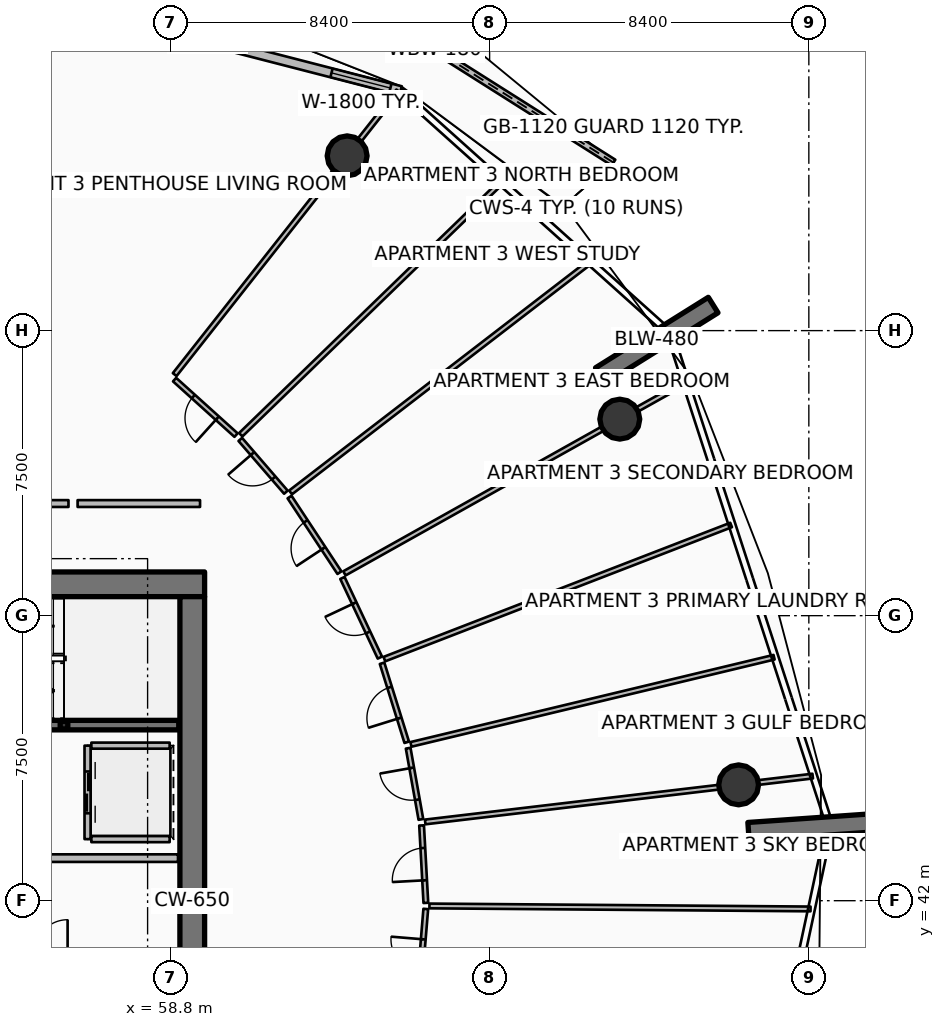
"""IFC4 building model, lengths in metres.
Left out: names, types, materials, properties, quantities, classifications, styles, units other than length and angle.
Written with IfcOpenShell. Run it as: python <this file> out.ifc"""

import sys

from ifc_helpers import new_model, si_unit, direction, frame, frame_2d, origin, origin_2d, place, context, subcontext, project, spatial, polyline, rectangle, hollow_rectangle, circle, outline, extrude, element, fill, save


model = new_model("IFC4")
c1 = context("Model", 3, precision=1e-05, world=origin(), true_north=direction((0.0, 1.0)))
c2 = subcontext(c1, "Body", "Model", "MODEL_VIEW")
j1 = project(units=[si_unit("LENGTHUNIT", "METRE"), si_unit("PLANEANGLEUNIT", "RADIAN")], contexts=[c1])
p1 = place(None, origin())
s1 = spatial("IfcSite", under=j1, at=p1, CompositionType="ELEMENT")
p2 = place(p1, origin())
s2 = spatial("IfcBuilding", under=s1, at=p2, CompositionType="ELEMENT")
p3 = place(p2, frame((0.0, 0.0, 187.8)))
s3 = spatial("IfcBuildingStorey", under=s2, at=p3, CompositionType="ELEMENT", Elevation=187.8)
p4 = place(p3, frame((49.95, 50.325, 0.0), z_axis=(0.0, 0.0, 1.0), x_axis=(1.0, 0.0, 0.0)))
e1 = element("IfcWall", 1, at=p4, inside=s3, PredefinedType="SHEAR", context=c2, shape_type="SweptSolid", body=[
    extrude(rectangle(XDim=9.75, YDim=0.65, at=frame_2d((4.875, 0.0))), origin(), (0.0, 0.0, 1.0), 3.75),
])
p5 = place(p3, frame((59.375, 34.0, 0.0), z_axis=(0.0, 0.0, 1.0), x_axis=(0.0, 1.0, 0.0)))
e2 = element("IfcWall", 2, at=p5, inside=s3, PredefinedType="SHEAR", context=c2, shape_type="SweptSolid", body=[
    extrude(rectangle(XDim=16.0, YDim=0.65, at=frame_2d((8.0, 0.0))), origin(), (0.0, 0.0, 1.0), 3.75),
])
p6 = place(p3, frame((56.0, 46.62, 0.0), z_axis=(0.0, 0.0, 1.0), x_axis=(1.0, 0.0, 0.0)))
e3 = element("IfcColumn", 3, at=p6, inside=s3, PredefinedType="COLUMN", context=c2, shape_type="SweptSolid", body=[
    extrude(hollow_rectangle(XDim=0.2, YDim=0.2, WallThickness=0.01, InnerFilletRadius=0.01, OuterFilletRadius=0.02, at=origin_2d()), origin(), (0.0, 0.0, 1.0), 1.67),
])
p7 = place(p3, frame((70.114, 55.818, 0.0), z_axis=(0.0, 0.0, 1.0), x_axis=(0.848033572426, 0.529942506352, 0.0)))
e4 = element("IfcWall", 4, at=p7, inside=s3, PredefinedType="SOLIDWALL", context=c2, shape_type="SweptSolid", body=[
    extrude(rectangle(XDim=3.5, YDim=0.48, at=frame_2d((1.75, 0.0))), origin(), (0.0, 0.0, 1.0), 3.75),
])
p8 = place(p3, frame((74.013, 43.819, 0.0), z_axis=(0.0, 0.0, 1.0), x_axis=(0.997568676264, 0.069690287244, 0.0)))
e5 = element("IfcWall", 5, at=p8, inside=s3, PredefinedType="SOLIDWALL", context=c2, shape_type="SweptSolid", body=[
    extrude(rectangle(XDim=3.5, YDim=0.48, at=frame_2d((1.75, 0.0))), origin(), (0.0, 0.0, 1.0), 3.75),
])
for number, where, z_axis, x_axis in (
    (6, (70.625, 54.671, 0.0), (0.0, 0.0, 1.0), (1.0, 0.0, 0.0)),
    (7, (63.451, 61.599, 0.0), (0.0, 0.0, 1.0), (1.0, 0.0, 0.0)),
    (8, (73.752, 45.048, 0.0), (0.0, 0.0, 1.0), (1.0, 0.0, 0.0)),
):
    element("IfcColumn", number, at=place(p3, frame(where, z_axis=z_axis, x_axis=x_axis)), inside=s3, PredefinedType="COLUMN", context=c2, shape_type="SweptSolid", body=[
        extrude(circle(Radius=0.525, at=origin_2d()), origin(), (0.0, 0.0, 1.0), 3.5),
    ])
p9 = place(p3, frame((70.46, 61.421, 0.0), z_axis=(0.0, 0.0, 1.0), x_axis=(-0.845278126761, 0.53432657469, 0.0)))
e9 = element("IfcWall", 9, at=p9, inside=s3, PredefinedType="PARAPET", context=c2, shape_type="SweptSolid", body=[
    extrude(outline(polyline([(0.0, 0.0), (11.123, 0.0), (11.123, 1.632), (5.562, 1.418), (0.0, 1.233), (0.0, 0.0)])), frame((0.0, 0.09, 0.0), z_axis=(0.0, -1.0, 0.0), x_axis=(1.0, 0.0, 0.0)), (0.0, 0.0, 1.0), 0.18),
])
p10 = place(p3, frame((64.86, 63.313, 0.0), z_axis=(0.0, 0.0, 1.0), x_axis=(-0.968374028006, 0.249502989727, 0.0)))
e10 = element("IfcWall", 10, at=p10, inside=s3, PredefinedType="SOLIDWALL", context=c2, shape_type="SweptSolid", body=[
    extrude(rectangle(XDim=10.494, YDim=0.24, at=frame_2d((5.247, 0.0))), origin(), (0.0, 0.0, 1.0), 2.45),
])
p11 = place(p10, frame((8.274, 0.0, 0.0)))
e11 = element("IfcOpeningElement", 11, at=p11, cuts=e10, PredefinedType="OPENING", context=c2, shape_type="SweptSolid", body=[
    extrude(rectangle(XDim=1.45, YDim=2.15, at=frame_2d((0.725, 1.075))), frame((0.0, 0.13, 0.0), z_axis=(0.0, -1.0, 0.0), x_axis=(1.0, 0.0, 0.0)), (0.0, 0.0, 1.0), 0.26),
])
p12 = place(p10, frame((0.28, 0.0, 0.65)))
e12 = element("IfcOpeningElement", 12, at=p12, cuts=e10, PredefinedType="OPENING", context=c2, shape_type="SweptSolid", body=[
    extrude(rectangle(XDim=1.6, YDim=1.5, at=frame_2d((0.8, 0.75))), frame((0.0, 0.13, 0.0), z_axis=(0.0, -1.0, 0.0), x_axis=(1.0, 0.0, 0.0)), (0.0, 0.0, 1.0), 0.26),
])
p13 = place(p3, frame((51.48, 46.62, 0.0), z_axis=(0.0, 0.0, 1.0), x_axis=(1.0, 0.0, 0.0)))
e13 = element("IfcWall", 13, at=p13, inside=s3, PredefinedType="SOLIDWALL", context=c2, shape_type="SweptSolid", body=[
    extrude(rectangle(XDim=7.54, YDim=0.25, at=frame_2d((3.77, 0.0))), origin(), (0.0, 0.0, 1.0), 3.5),
])
p14 = place(p13, frame((0.3, 0.0, 0.0)))
e14 = element("IfcOpeningElement", 14, at=p14, cuts=e13, PredefinedType="OPENING", context=c2, shape_type="SweptSolid", body=[
    extrude(rectangle(XDim=1.55, YDim=2.15, at=frame_2d((0.775, 1.075))), frame((0.0, 0.135, 0.0), z_axis=(0.0, -1.0, 0.0), x_axis=(1.0, 0.0, 0.0)), (0.0, 0.0, 1.0), 0.27),
])
p15 = place(p3, frame((56.62, 46.08, 0.0), z_axis=(0.0, 0.0, 1.0), x_axis=(0.0, -1.0, 0.0)))
e15 = element("IfcWall", 15, at=p15, inside=s3, PredefinedType="PARTITIONING", context=c2, shape_type="SweptSolid", body=[
    extrude(rectangle(XDim=2.46, YDim=0.16, at=frame_2d((1.23, 0.0))), origin(), (0.0, 0.0, 1.0), 3.5),
])
p16 = place(p15, frame((0.68, 0.0, 0.0)))
e16 = element("IfcOpeningElement", 16, at=p16, cuts=e15, PredefinedType="OPENING", context=c2, shape_type="SweptSolid", body=[
    extrude(rectangle(XDim=1.1, YDim=2.1, at=frame_2d((0.55, 1.05))), frame((0.0, 0.09, 0.0), z_axis=(0.0, -1.0, 0.0), x_axis=(1.0, 0.0, 0.0)), (0.0, 0.0, 1.0), 0.18),
])
for number, where, z_axis, x_axis in (
    (17, (56.72, 46.08, 0.0), (0.0, 0.0, 1.0), (1.0, 0.0, 0.0)),
    (18, (56.72, 43.62, 0.0), (0.0, 0.0, 1.0), (1.0, 0.0, 0.0)),
):
    element("IfcWall", number, at=place(p3, frame(where, z_axis=z_axis, x_axis=x_axis)), inside=s3, PredefinedType="PARTITIONING", context=c2, shape_type="SweptSolid", body=[
        extrude(rectangle(XDim=2.06, YDim=0.16, at=frame_2d((1.03, 0.0))), origin(), (0.0, 0.0, 1.0), 3.5),
    ])
p17 = place(p3, frame((50.12, 43.12, 0.0), z_axis=(0.0, 0.0, 1.0), x_axis=(1.0, 0.0, 0.0)))
e19 = element("IfcWall", 19, at=p17, inside=s3, PredefinedType="PARTITIONING", context=c2, shape_type="SweptSolid", body=[
    extrude(rectangle(XDim=8.88, YDim=0.2, at=frame_2d((4.44, 0.0))), origin(), (0.0, 0.0, 1.0), 3.5),
])
p18 = place(p3, frame((56.118, 52.45, 0.0), z_axis=(0.0, 0.0, 1.0), x_axis=(-1.0, 0.0, 0.0)))
e20 = element("IfcWall", 20, at=p18, inside=s3, PredefinedType="PARTITIONING", context=c2, shape_type="SweptSolid", body=[
    extrude(rectangle(XDim=5.051, YDim=0.18, at=frame_2d((2.525, 0.0))), origin(), (0.0, 0.0, 1.0), 2.94),
])
p19 = place(p18, frame((1.975, 0.0, 0.0)))
e21 = element("IfcOpeningElement", 21, at=p19, cuts=e20, PredefinedType="OPENING", context=c2, shape_type="SweptSolid", body=[
    extrude(rectangle(XDim=1.1, YDim=2.1, at=frame_2d((0.55, 1.05))), frame((0.0, 0.1, 0.0), z_axis=(0.0, -1.0, 0.0), x_axis=(1.0, 0.0, 0.0)), (0.0, 0.0, 1.0), 0.2),
])
p20 = place(p3, frame((65.616, 41.862, 0.0), z_axis=(0.0, 0.0, 1.0), x_axis=(0.999969275456, -0.007838886617, 0.0)))
e22 = element("IfcWall", 22, at=p20, inside=s3, PredefinedType="PARTITIONING", context=c2, shape_type="SweptSolid", body=[
    extrude(rectangle(XDim=10.029, YDim=0.125, at=frame_2d((5.014, 0.0))), origin(), (0.0, 0.0, 1.0), 2.94),
])
p21 = place(p3, frame((65.318, 39.338, 0.0), z_axis=(0.0, 0.0, 1.0), x_axis=(0.082403040097, 0.996599086385, 0.0)))
e23 = element("IfcWall", 23, at=p21, inside=s3, PredefinedType="PARTITIONING", context=c2, shape_type="SweptSolid", body=[
    extrude(rectangle(XDim=2.453, YDim=0.125, at=frame_2d((1.227, 0.0))), origin(), (0.0, 0.0, 1.0), 2.94),
])
p22 = place(p21, frame((0.802, 0.0, 0.0)))
e24 = element("IfcOpeningElement", 24, at=p22, cuts=e23, PredefinedType="OPENING", context=c2, shape_type="SweptSolid", body=[
    extrude(rectangle(XDim=0.85, YDim=2.06, at=frame_2d((0.425, 1.03))), frame((0.0, 0.073, 0.0), z_axis=(0.0, -1.0, 0.0), x_axis=(1.0, 0.0, 0.0)), (0.0, 0.0, 1.0), 0.145),
])
p23 = place(p3, frame((65.522, 41.942, 0.0), z_axis=(0.0, 0.0, 1.0), x_axis=(-0.055019552889, 0.998485277207, 0.0)))
e25 = element("IfcWall", 25, at=p23, inside=s3, PredefinedType="PARTITIONING", context=c2, shape_type="SweptSolid", body=[
    extrude(rectangle(XDim=2.041, YDim=0.125, at=frame_2d((1.021, 0.0))), origin(), (0.0, 0.0, 1.0), 2.94),
])
p24 = place(p23, frame((0.595, 0.0, 0.0)))
e26 = element("IfcOpeningElement", 26, at=p24, cuts=e25, PredefinedType="OPENING", context=c2, shape_type="SweptSolid", body=[
    extrude(rectangle(XDim=0.85, YDim=2.06, at=frame_2d((0.425, 1.03))), frame((0.0, 0.073, 0.0), z_axis=(0.0, -1.0, 0.0), x_axis=(1.0, 0.0, 0.0)), (0.0, 0.0, 1.0), 0.145),
])
p25 = place(p3, frame((65.505, 44.072, 0.0), z_axis=(0.0, 0.0, 1.0), x_axis=(0.993069706364, 0.117526840773, 0.0)))
e27 = element("IfcWall", 27, at=p25, inside=s3, PredefinedType="PARTITIONING", context=c2, shape_type="SweptSolid", body=[
    extrude(rectangle(XDim=10.268, YDim=0.125, at=frame_2d((5.134, 0.0))), origin(), (0.0, 0.0, 1.0), 2.94),
])
p26 = place(p3, frame((65.13, 46.113, 0.0), z_axis=(0.0, 0.0, 1.0), x_axis=(0.972369708309, 0.233446247267, 0.0)))
e28 = element("IfcWall", 28, at=p26, inside=s3, PredefinedType="PARTITIONING", context=c2, shape_type="SweptSolid", body=[
    extrude(rectangle(XDim=9.826, YDim=0.125, at=frame_2d((4.913, 0.0))), origin(), (0.0, 0.0, 1.0), 2.94),
])
p27 = place(p3, frame((64.43, 48.356, 0.0), z_axis=(0.0, 0.0, 1.0), x_axis=(0.932640168577, 0.360807865709, 0.0)))
e29 = element("IfcWall", 29, at=p27, inside=s3, PredefinedType="PARTITIONING", context=c2, shape_type="SweptSolid", body=[
    extrude(rectangle(XDim=9.783, YDim=0.125, at=frame_2d((4.892, 0.0))), origin(), (0.0, 0.0, 1.0), 2.94),
])
p28 = place(p3, frame((65.391, 44.139, 0.0), z_axis=(0.0, 0.0, 1.0), x_axis=(-0.175724047716, 0.984439464393, 0.0)))
e30 = element("IfcWall", 30, at=p28, inside=s3, PredefinedType="PARTITIONING", context=c2, shape_type="SweptSolid", body=[
    extrude(rectangle(XDim=1.903, YDim=0.125, at=frame_2d((0.952, 0.0))), origin(), (0.0, 0.0, 1.0), 2.94),
])
p29 = place(p28, frame((0.527, 0.0, 0.0)))
e31 = element("IfcOpeningElement", 31, at=p29, cuts=e30, PredefinedType="OPENING", context=c2, shape_type="SweptSolid", body=[
    extrude(rectangle(XDim=0.85, YDim=2.06, at=frame_2d((0.425, 1.03))), frame((0.0, 0.073, 0.0), z_axis=(0.0, -1.0, 0.0), x_axis=(1.0, 0.0, 0.0)), (0.0, 0.0, 1.0), 0.145),
])
p30 = place(p3, frame((65.019, 46.168, 0.0), z_axis=(0.0, 0.0, 1.0), x_axis=(-0.297777206139, 0.954635394014, 0.0)))
e32 = element("IfcWall", 32, at=p30, inside=s3, PredefinedType="PARTITIONING", context=c2, shape_type="SweptSolid", body=[
    extrude(rectangle(XDim=2.178, YDim=0.125, at=frame_2d((1.089, 0.0))), origin(), (0.0, 0.0, 1.0), 2.94),
])
p31 = place(p30, frame((0.664, 0.0, 0.0)))
e33 = element("IfcOpeningElement", 33, at=p31, cuts=e32, PredefinedType="OPENING", context=c2, shape_type="SweptSolid", body=[
    extrude(rectangle(XDim=0.85, YDim=2.06, at=frame_2d((0.425, 1.03))), frame((0.0, 0.073, 0.0), z_axis=(0.0, -1.0, 0.0), x_axis=(1.0, 0.0, 0.0)), (0.0, 0.0, 1.0), 0.145),
])
p32 = place(p3, frame((64.312, 48.396, 0.0), z_axis=(0.0, 0.0, 1.0), x_axis=(-0.425705646023, 0.904861703767, 0.0)))
e34 = element("IfcWall", 34, at=p32, inside=s3, PredefinedType="PARTITIONING", context=c2, shape_type="SweptSolid", body=[
    extrude(rectangle(XDim=2.316, YDim=0.125, at=frame_2d((1.158, 0.0))), origin(), (0.0, 0.0, 1.0), 2.94),
])
p33 = place(p32, frame((0.733, 0.0, 0.0)))
e35 = element("IfcOpeningElement", 35, at=p33, cuts=e34, PredefinedType="OPENING", context=c2, shape_type="SweptSolid", body=[
    extrude(rectangle(XDim=0.85, YDim=2.06, at=frame_2d((0.425, 1.03))), frame((0.0, 0.073, 0.0), z_axis=(0.0, -1.0, 0.0), x_axis=(1.0, 0.0, 0.0)), (0.0, 0.0, 1.0), 0.145),
])
p34 = place(p3, frame((59.58, 52.45, 0.0), z_axis=(0.0, 0.0, 1.0), x_axis=(-1.0, 0.0, 0.0)))
e36 = element("IfcWall", 36, at=p34, inside=s3, PredefinedType="PARTITIONING", context=c2, shape_type="SweptSolid", body=[
    extrude(rectangle(XDim=3.222, YDim=0.18, at=frame_2d((1.611, 0.0))), origin(), (0.0, 0.0, 1.0), 2.94),
])
p35 = place(p3, frame((63.379, 50.613, 0.0), z_axis=(0.0, 0.0, 1.0), x_axis=(0.872503583261, 0.488607712994, 0.0)))
e37 = element("IfcWall", 37, at=p35, inside=s3, PredefinedType="PARTITIONING", context=c2, shape_type="SweptSolid", body=[
    extrude(rectangle(XDim=10.268, YDim=0.125, at=frame_2d((5.134, 0.0))), origin(), (0.0, 0.0, 1.0), 2.94),
])
p36 = place(p3, frame((58.913, 55.843, 0.0), z_axis=(0.0, 0.0, 1.0), x_axis=(0.619083548323, 0.785325130246, 0.0)))
e38 = element("IfcWall", 38, at=p36, inside=s3, PredefinedType="PARTITIONING", context=c2, shape_type="SweptSolid", body=[
    extrude(rectangle(XDim=9.503, YDim=0.125, at=frame_2d((4.751, 0.0))), origin(), (0.0, 0.0, 1.0), 2.94),
])
p37 = place(p3, frame((61.962, 52.743, 0.0), z_axis=(0.0, 0.0, 1.0), x_axis=(0.792560870927, 0.609792805693, 0.0)))
e39 = element("IfcWall", 39, at=p37, inside=s3, PredefinedType="PARTITIONING", context=c2, shape_type="SweptSolid", body=[
    extrude(rectangle(XDim=9.922, YDim=0.125, at=frame_2d((4.961, 0.0))), origin(), (0.0, 0.0, 1.0), 2.94),
])
p38 = place(p3, frame((60.651, 54.26, 0.0), z_axis=(0.0, 0.0, 1.0), x_axis=(0.718131329051, 0.695907604669, 0.0)))
e40 = element("IfcWall", 40, at=p38, inside=s3, PredefinedType="PARTITIONING", context=c2, shape_type="SweptSolid", body=[
    extrude(rectangle(XDim=9.524, YDim=0.125, at=frame_2d((4.762, 0.0))), origin(), (0.0, 0.0, 1.0), 2.94),
])
p39 = place(p3, frame((63.248, 50.631, 0.0), z_axis=(0.0, 0.0, 1.0), x_axis=(-0.550605373428, 0.834765669366, 0.0)))
e41 = element("IfcWall", 41, at=p39, inside=s3, PredefinedType="PARTITIONING", context=c2, shape_type="SweptSolid", body=[
    extrude(rectangle(XDim=2.384, YDim=0.125, at=frame_2d((1.192, 0.0))), origin(), (0.0, 0.0, 1.0), 2.94),
])
p40 = place(p39, frame((0.767, 0.0, 0.0)))
e42 = element("IfcOpeningElement", 42, at=p40, cuts=e41, PredefinedType="OPENING", context=c2, shape_type="SweptSolid", body=[
    extrude(rectangle(XDim=0.85, YDim=2.06, at=frame_2d((0.425, 1.03))), frame((0.0, 0.073, 0.0), z_axis=(0.0, -1.0, 0.0), x_axis=(1.0, 0.0, 0.0)), (0.0, 0.0, 1.0), 0.145),
])
p41 = place(p3, frame((61.839, 52.749, 0.0), z_axis=(0.0, 0.0, 1.0), x_axis=(-0.653952359422, 0.756535730555, 0.0)))
e43 = element("IfcWall", 43, at=p41, inside=s3, PredefinedType="PARTITIONING", context=c2, shape_type="SweptSolid", body=[
    extrude(rectangle(XDim=1.835, YDim=0.125, at=frame_2d((0.917, 0.0))), origin(), (0.0, 0.0, 1.0), 2.94),
])
p42 = place(p41, frame((0.492, 0.0, 0.0)))
e44 = element("IfcOpeningElement", 44, at=p42, cuts=e43, PredefinedType="OPENING", context=c2, shape_type="SweptSolid", body=[
    extrude(rectangle(XDim=0.85, YDim=2.06, at=frame_2d((0.425, 1.03))), frame((0.0, 0.073, 0.0), z_axis=(0.0, -1.0, 0.0), x_axis=(1.0, 0.0, 0.0)), (0.0, 0.0, 1.0), 0.145),
])
p43 = place(p3, frame((60.527, 54.251, 0.0), z_axis=(0.0, 0.0, 1.0), x_axis=(-0.742223129556, 0.670152837755, 0.0)))
e45 = element("IfcWall", 45, at=p43, inside=s3, PredefinedType="PARTITIONING", context=c2, shape_type="SweptSolid", body=[
    extrude(rectangle(XDim=2.178, YDim=0.125, at=frame_2d((1.089, 0.0))), origin(), (0.0, 0.0, 1.0), 2.94),
])
p44 = place(p43, frame((0.664, 0.0, 0.0)))
e46 = element("IfcOpeningElement", 46, at=p44, cuts=e45, PredefinedType="OPENING", context=c2, shape_type="SweptSolid", body=[
    extrude(rectangle(XDim=0.85, YDim=2.06, at=frame_2d((0.425, 1.03))), frame((0.0, 0.073, 0.0), z_axis=(0.0, -1.0, 0.0), x_axis=(1.0, 0.0, 0.0)), (0.0, 0.0, 1.0), 0.145),
])
p45 = place(p12, origin())
e47 = element("IfcWindow", 47, at=p45, inside=s3, PartitioningType="SINGLE_PANEL", PredefinedType="WINDOW", context=c2, shape_type="SweptSolid", body=[
    extrude(rectangle(XDim=1.6, YDim=1.5, at=frame_2d((0.8, 0.75))), frame((0.0, 0.03, 0.0), z_axis=(0.0, -1.0, 0.0), x_axis=(1.0, 0.0, 0.0)), (0.0, 0.0, 1.0), 0.06),
])
fill(e12, e47)
p46 = place(p16, origin())
e48 = element("IfcDoor", 48, at=p46, inside=s3, OperationType="DOUBLE_DOOR_SLIDING", PredefinedType="DOOR", context=c2, shape_type="SweptSolid", body=[
    extrude(rectangle(XDim=1.1, YDim=2.1, at=frame_2d((0.55, 1.05))), frame((0.0, 0.025, 0.0), z_axis=(0.0, -1.0, 0.0), x_axis=(1.0, 0.0, 0.0)), (0.0, 0.0, 1.0), 0.05),
])
fill(e16, e48)
p47 = place(p22, origin())
e49 = element("IfcDoor", 49, at=p47, inside=s3, OperationType="SINGLE_SWING_RIGHT", PredefinedType="DOOR", context=c2, shape_type="SweptSolid", body=[
    extrude(rectangle(XDim=0.85, YDim=2.06, at=frame_2d((0.425, 1.03))), frame((0.0, 0.025, 0.0), z_axis=(0.0, -1.0, 0.0), x_axis=(1.0, 0.0, 0.0)), (0.0, 0.0, 1.0), 0.05),
])
fill(e24, e49)
p48 = place(p24, origin())
e50 = element("IfcDoor", 50, at=p48, inside=s3, OperationType="SINGLE_SWING_LEFT", PredefinedType="DOOR", context=c2, shape_type="SweptSolid", body=[
    extrude(rectangle(XDim=0.85, YDim=2.06, at=frame_2d((0.425, 1.03))), frame((0.0, 0.025, 0.0), z_axis=(0.0, -1.0, 0.0), x_axis=(1.0, 0.0, 0.0)), (0.0, 0.0, 1.0), 0.05),
])
fill(e26, e50)
p49 = place(p29, origin())
e51 = element("IfcDoor", 51, at=p49, inside=s3, OperationType="SINGLE_SWING_RIGHT", PredefinedType="DOOR", context=c2, shape_type="SweptSolid", body=[
    extrude(rectangle(XDim=0.85, YDim=2.06, at=frame_2d((0.425, 1.03))), frame((0.0, 0.025, 0.0), z_axis=(0.0, -1.0, 0.0), x_axis=(1.0, 0.0, 0.0)), (0.0, 0.0, 1.0), 0.05),
])
fill(e31, e51)
p50 = place(p31, origin())
e52 = element("IfcDoor", 52, at=p50, inside=s3, OperationType="SINGLE_SWING_LEFT", PredefinedType="DOOR", context=c2, shape_type="SweptSolid", body=[
    extrude(rectangle(XDim=0.85, YDim=2.06, at=frame_2d((0.425, 1.03))), frame((0.0, 0.025, 0.0), z_axis=(0.0, -1.0, 0.0), x_axis=(1.0, 0.0, 0.0)), (0.0, 0.0, 1.0), 0.05),
])
fill(e33, e52)
p51 = place(p33, origin())
e53 = element("IfcDoor", 53, at=p51, inside=s3, OperationType="SINGLE_SWING_RIGHT", PredefinedType="DOOR", context=c2, shape_type="SweptSolid", body=[
    extrude(rectangle(XDim=0.85, YDim=2.06, at=frame_2d((0.425, 1.03))), frame((0.0, 0.025, 0.0), z_axis=(0.0, -1.0, 0.0), x_axis=(1.0, 0.0, 0.0)), (0.0, 0.0, 1.0), 0.05),
])
fill(e35, e53)
p52 = place(p40, origin())
e54 = element("IfcDoor", 54, at=p52, inside=s3, OperationType="SINGLE_SWING_LEFT", PredefinedType="DOOR", context=c2, shape_type="SweptSolid", body=[
    extrude(rectangle(XDim=0.85, YDim=2.06, at=frame_2d((0.425, 1.03))), frame((0.0, 0.025, 0.0), z_axis=(0.0, -1.0, 0.0), x_axis=(1.0, 0.0, 0.0)), (0.0, 0.0, 1.0), 0.05),
])
fill(e42, e54)
p53 = place(p42, origin())
e55 = element("IfcDoor", 55, at=p53, inside=s3, OperationType="SINGLE_SWING_RIGHT", PredefinedType="DOOR", context=c2, shape_type="SweptSolid", body=[
    extrude(rectangle(XDim=0.85, YDim=2.06, at=frame_2d((0.425, 1.03))), frame((0.0, 0.025, 0.0), z_axis=(0.0, -1.0, 0.0), x_axis=(1.0, 0.0, 0.0)), (0.0, 0.0, 1.0), 0.05),
])
fill(e44, e55)
p54 = place(p44, origin())
e56 = element("IfcDoor", 56, at=p54, inside=s3, OperationType="SINGLE_SWING_LEFT", PredefinedType="DOOR", context=c2, shape_type="SweptSolid", body=[
    extrude(rectangle(XDim=0.85, YDim=2.06, at=frame_2d((0.425, 1.03))), frame((0.0, 0.025, 0.0), z_axis=(0.0, -1.0, 0.0), x_axis=(1.0, 0.0, 0.0)), (0.0, 0.0, 1.0), 0.05),
])
fill(e46, e56)
save(model, sys.argv[1])
